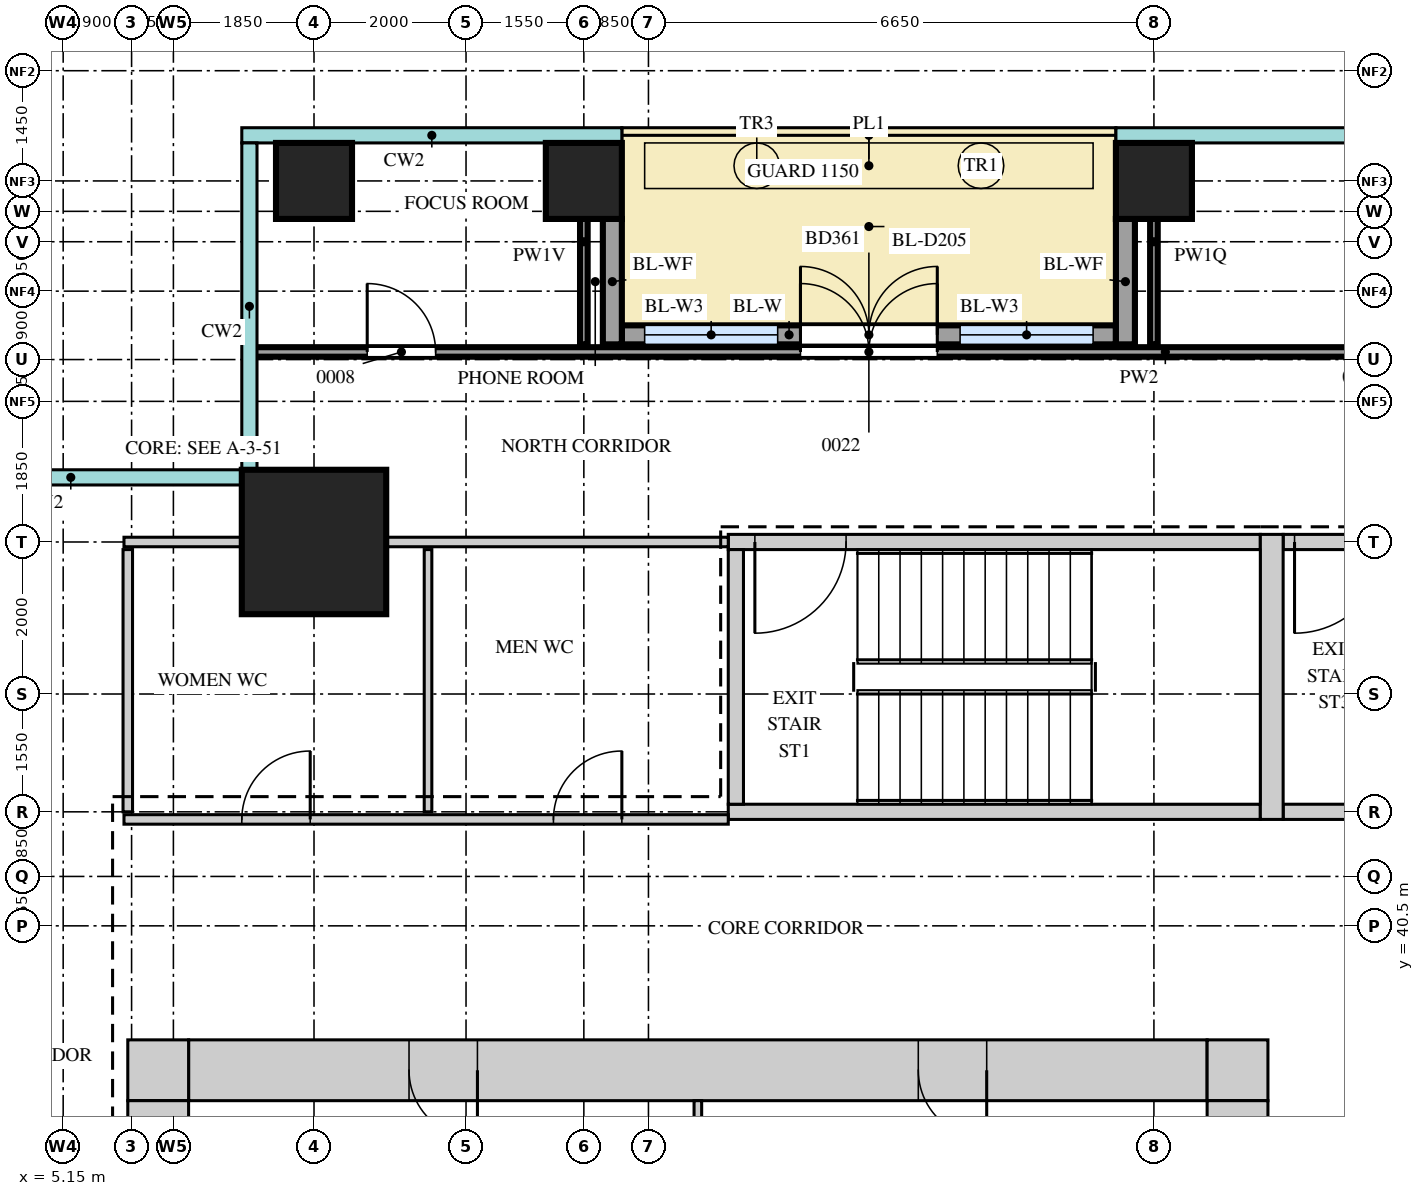
"""IFC4 building model, lengths in metres.
Left out: names, types, materials, properties, quantities, classifications, styles, units other than length and angle.
Written with IfcOpenShell. Run it as: python <this file> out.ifc"""

import sys

from ifc_helpers import new_model, si_unit, direction, frame, frame_2d, origin, origin_2d, place, context, subcontext, project, spatial, rectangle, extrude, source, transform, mapped, element, fill, save


model = new_model("IFC4")
c1 = context("Model", 3, precision=1e-05, world=origin(), true_north=direction((0.0, 1.0)))
c2 = subcontext(c1, "Body", "Model", "MODEL_VIEW")
j1 = project(units=[si_unit("LENGTHUNIT", "METRE"), si_unit("PLANEANGLEUNIT", "RADIAN")], contexts=[c1])
p1 = place(None, origin())
s1 = spatial("IfcSite", under=j1, at=p1, CompositionType="ELEMENT")
p2 = place(p1, origin())
s2 = spatial("IfcBuilding", under=s1, at=p2, CompositionType="ELEMENT")
p3 = place(p2, frame((0.0, 0.0, 168.7)))
s3 = spatial("IfcBuildingStorey", under=s2, at=p3, CompositionType="ELEMENT", Elevation=168.7)
m1 = source(origin(), c2, "Body", "SweptSolid", [
    extrude(rectangle(XDim=13.4, YDim=0.8, at=frame_2d((6.7, 0.0))), origin(), (0.0, 0.0, 1.0), 3.75),
])
p4 = place(p3, frame((6.8, 38.6, 0.0), z_axis=(0.0, 0.0, 1.0), x_axis=(1.0, 0.0, 0.0)))
e1 = element("IfcWall", 1, at=p4, inside=s3, PredefinedType="SHEAR", context=c2, shape_type="MappedRepresentation", body=[
    mapped(m1, transform((0.0, 0.0, 0.0))),
])
m2 = source(origin(), c2, "Body", "SweptSolid", [
    extrude(rectangle(XDim=0.9, YDim=2.1, at=frame_2d((0.45, 1.05))), frame((0.0, 0.41, 0.0), z_axis=(0.0, -1.0, 0.0), x_axis=(1.0, 0.0, 0.0)), (0.0, 0.0, 1.0), 0.82),
])
p5 = place(p4, frame((2.9, 0.0, 0.0)))
e2 = element("IfcOpeningElement", 2, at=p5, cuts=e1, PredefinedType="OPENING", context=c2, shape_type="MappedRepresentation", body=[
    mapped(m2, transform((0.0, 0.0, 0.0))),
])
p6 = place(p4, frame((9.6, 0.0, 0.0)))
e3 = element("IfcOpeningElement", 3, at=p6, cuts=e1, PredefinedType="OPENING", context=c2, shape_type="MappedRepresentation", body=[
    mapped(m2, transform((0.0, 0.0, 0.0))),
])
m3 = source(origin(), c2, "Body", "SweptSolid", [
    extrude(rectangle(XDim=0.8, YDim=0.8, at=frame_2d((0.4, 0.0))), origin(), (0.0, 0.0, 1.0), 3.75),
])
for number, where, z_axis, x_axis in (
    (4, (20.2, 38.6, 0.0), (0.0, 0.0, 1.0), (1.0, 0.0, 0.0)),
    (5, (6.0, 38.6, 0.0), (0.0, 0.0, 1.0), (1.0, 0.0, 0.0)),
):
    element("IfcWall", number, at=place(p3, frame(where, z_axis=z_axis, x_axis=x_axis)), inside=s3, PredefinedType="SHEAR", context=c2, shape_type="MappedRepresentation", body=[
        mapped(m3, transform((0.0, 0.0, 0.0))),
    ])
m4 = source(origin(), c2, "Body", "SweptSolid", [
    extrude(rectangle(XDim=22.4, YDim=0.8, at=frame_2d((11.2, 0.0))), origin(), (0.0, 0.0, 1.0), 3.75),
])
p7 = place(p3, frame((20.6, 15.8, 0.0), z_axis=(0.0, 0.0, 1.0), x_axis=(0.0, 1.0, 0.0)))
e6 = element("IfcWall", 6, at=p7, inside=s3, PredefinedType="SHEAR", context=c2, shape_type="MappedRepresentation", body=[
    mapped(m4, transform((0.0, 0.0, 0.0))),
])
m5 = source(origin(), c2, "Body", "SweptSolid", [
    extrude(rectangle(XDim=1.8, YDim=2.1, at=frame_2d((0.9, 1.05))), frame((0.0, 0.41, 0.0), z_axis=(0.0, -1.0, 0.0), x_axis=(1.0, 0.0, 0.0)), (0.0, 0.0, 1.0), 0.82),
])
p8 = place(p7, frame((10.7, 0.0, 0.0)))
e7 = element("IfcOpeningElement", 7, at=p8, cuts=e6, PredefinedType="OPENING", context=c2, shape_type="MappedRepresentation", body=[
    mapped(m5, transform((0.0, 0.0, 0.0))),
])
p9 = place(p7, frame((0.35, 0.0, 0.0)))
e8 = element("IfcOpeningElement", 8, at=p9, cuts=e6, PredefinedType="OPENING", context=c2, shape_type="MappedRepresentation", body=[
    mapped(m2, transform((0.0, 0.0, 0.0))),
])
p10 = place(p7, frame((2.8, 0.0, 0.0)))
e9 = element("IfcOpeningElement", 9, at=p10, cuts=e6, PredefinedType="OPENING", context=c2, shape_type="MappedRepresentation", body=[
    mapped(m2, transform((0.0, 0.0, 0.0))),
])
p11 = place(p7, frame((5.55, 0.0, 0.0)))
e10 = element("IfcOpeningElement", 10, at=p11, cuts=e6, PredefinedType="OPENING", context=c2, shape_type="MappedRepresentation", body=[
    mapped(m2, transform((0.0, 0.0, 0.0))),
])
p12 = place(p3, frame((6.4, 15.8, 0.0), z_axis=(0.0, 0.0, 1.0), x_axis=(0.0, 1.0, 0.0)))
e11 = element("IfcWall", 11, at=p12, inside=s3, PredefinedType="SHEAR", context=c2, shape_type="MappedRepresentation", body=[
    mapped(m4, transform((0.0, 0.0, 0.0))),
])
m6 = source(origin(), c2, "Body", "SweptSolid", [
    extrude(rectangle(XDim=7.0, YDim=0.2, at=frame_2d((3.5, 0.0))), origin(), (0.0, 0.0, 1.0), 3.75),
])
p13 = place(p3, frame((13.9, 45.55, 0.0), z_axis=(0.0, 0.0, 1.0), x_axis=(1.0, 0.0, 0.0)))
e12 = element("IfcWall", 12, at=p13, inside=s3, PredefinedType="SHEAR", context=c2, shape_type="MappedRepresentation", body=[
    mapped(m6, transform((0.0, 0.0, 0.0))),
])
m7 = source(origin(), c2, "Body", "SweptSolid", [
    extrude(rectangle(XDim=1.2, YDim=2.1, at=frame_2d((0.6, 1.05))), frame((0.0, 0.11, 0.0), z_axis=(0.0, -1.0, 0.0), x_axis=(1.0, 0.0, 0.0)), (0.0, 0.0, 1.0), 0.22),
])
p14 = place(p13, frame((0.35, 0.0, 0.0)))
e13 = element("IfcOpeningElement", 13, at=p14, cuts=e12, PredefinedType="OPENING", context=c2, shape_type="MappedRepresentation", body=[
    mapped(m7, transform((0.0, 0.0, 0.0))),
])
p15 = place(p3, frame((13.9, 42.0, 0.0), z_axis=(0.0, 0.0, 1.0), x_axis=(1.0, 0.0, 0.0)))
e14 = element("IfcWall", 14, at=p15, inside=s3, PredefinedType="SHEAR", context=c2, shape_type="MappedRepresentation", body=[
    mapped(m6, transform((0.0, 0.0, 0.0))),
])
m8 = source(origin(), c2, "Body", "SweptSolid", [
    extrude(rectangle(XDim=7.1, YDim=0.2, at=frame_2d((3.55, 0.0))), origin(), (0.0, 0.0, 1.0), 3.75),
])
p16 = place(p3, frame((21.2, 45.55, 0.0), z_axis=(0.0, 0.0, 1.0), x_axis=(1.0, 0.0, 0.0)))
e15 = element("IfcWall", 15, at=p16, inside=s3, PredefinedType="SHEAR", context=c2, shape_type="MappedRepresentation", body=[
    mapped(m8, transform((0.0, 0.0, 0.0))),
])
p17 = place(p16, frame((0.15, 0.0, 0.0)))
e16 = element("IfcOpeningElement", 16, at=p17, cuts=e15, PredefinedType="OPENING", context=c2, shape_type="MappedRepresentation", body=[
    mapped(m7, transform((0.0, 0.0, 0.0))),
])
p18 = place(p3, frame((21.2, 42.0, 0.0), z_axis=(0.0, 0.0, 1.0), x_axis=(1.0, 0.0, 0.0)))
e17 = element("IfcWall", 17, at=p18, inside=s3, PredefinedType="SHEAR", context=c2, shape_type="MappedRepresentation", body=[
    mapped(m8, transform((0.0, 0.0, 0.0))),
])
m9 = source(origin(), c2, "Body", "SweptSolid", [
    extrude(rectangle(XDim=3.75, YDim=0.3, at=frame_2d((1.875, 0.0))), origin(), (0.0, 0.0, 1.0), 3.75),
])
p19 = place(p3, frame((21.05, 41.9, 0.0), z_axis=(0.0, 0.0, 1.0), x_axis=(0.0, 1.0, 0.0)))
e18 = element("IfcWall", 18, at=p19, inside=s3, PredefinedType="SHEAR", context=c2, shape_type="MappedRepresentation", body=[
    mapped(m9, transform((0.0, 0.0, 0.0))),
])
m10 = source(origin(), c2, "Body", "SweptSolid", [
    extrude(rectangle(XDim=3.35, YDim=0.2, at=frame_2d((1.675, 0.0))), origin(), (0.0, 0.0, 1.0), 3.75),
])
p20 = place(p3, frame((14.0, 42.1, 0.0), z_axis=(0.0, 0.0, 1.0), x_axis=(0.0, 1.0, 0.0)))
e19 = element("IfcWall", 19, at=p20, inside=s3, PredefinedType="SHEAR", context=c2, shape_type="MappedRepresentation", body=[
    mapped(m10, transform((0.0, 0.0, 0.0))),
])
m11 = source(origin(), c2, "Body", "SweptSolid", [
    extrude(rectangle(XDim=1.9, YDim=1.9, at=origin_2d()), origin(), (0.0, 0.0, 1.0), 4.0),
])
p21 = place(p3, frame((8.45, 45.55, 0.0), z_axis=(0.0, 0.0, 1.0), x_axis=(1.0, 0.0, 0.0)))
e20 = element("IfcColumn", 20, at=p21, inside=s3, PredefinedType="COLUMN", context=c2, shape_type="MappedRepresentation", body=[
    mapped(m11, transform((0.0, 0.0, 0.0))),
])
m12 = source(origin(), c2, "Body", "SweptSolid", [
    extrude(rectangle(XDim=1.0, YDim=1.0, at=origin_2d()), origin(), (0.0, 0.0, 1.0), 3.75),
])
for number, where, z_axis, x_axis in (
    (21, (8.45, 50.3, 0.0), (0.0, 0.0, 1.0), (1.0, 0.0, 0.0)),
    (22, (12.0, 50.3, 0.0), (0.0, 0.0, 1.0), (1.0, 0.0, 0.0)),
    (23, (19.5, 50.3, 0.0), (0.0, 0.0, 1.0), (1.0, 0.0, 0.0)),
):
    element("IfcColumn", number, at=place(p3, frame(where, z_axis=z_axis, x_axis=x_axis)), inside=s3, PredefinedType="COLUMN", context=c2, shape_type="MappedRepresentation", body=[
        mapped(m12, transform((0.0, 0.0, 0.0))),
    ])
m13 = source(origin(), c2, "Body", "SweptSolid", [
    extrude(rectangle(XDim=6.5, YDim=0.25, at=frame_2d((3.25, 0.0))), origin(), (0.0, 0.0, 1.0), 3.75),
])
p22 = place(p3, frame((12.5, 48.275, 0.0), z_axis=(0.0, 0.0, 1.0), x_axis=(1.0, 0.0, 0.0)))
e24 = element("IfcWall", 24, at=p22, inside=s3, PredefinedType="SOLIDWALL", context=c2, shape_type="MappedRepresentation", body=[
    mapped(m13, transform((0.0, 0.0, 0.0))),
])
m14 = source(origin(), c2, "Body", "SweptSolid", [
    extrude(rectangle(XDim=1.75, YDim=2.4, at=frame_2d((0.875, 1.2))), frame((0.0, 0.135, 0.0), z_axis=(0.0, -1.0, 0.0), x_axis=(1.0, 0.0, 0.0)), (0.0, 0.0, 1.0), 0.27),
])
p23 = place(p22, frame((0.3, 0.0, 0.0)))
e25 = element("IfcOpeningElement", 25, at=p23, cuts=e24, PredefinedType="OPENING", context=c2, shape_type="MappedRepresentation", body=[
    mapped(m14, transform((0.0, 0.0, 0.0))),
])
p24 = place(p22, frame((4.45, 0.0, 0.0)))
e26 = element("IfcOpeningElement", 26, at=p24, cuts=e24, PredefinedType="OPENING", context=c2, shape_type="MappedRepresentation", body=[
    mapped(m14, transform((0.0, 0.0, 0.0))),
])
m15 = source(origin(), c2, "Body", "SweptSolid", [
    extrude(rectangle(XDim=1.8, YDim=2.4, at=frame_2d((0.9, 1.2))), frame((0.0, 0.135, 0.0), z_axis=(0.0, -1.0, 0.0), x_axis=(1.0, 0.0, 0.0)), (0.0, 0.0, 1.0), 0.27),
])
p25 = place(p22, frame((2.35, 0.0, 0.0)))
e27 = element("IfcOpeningElement", 27, at=p25, cuts=e24, PredefinedType="OPENING", context=c2, shape_type="MappedRepresentation", body=[
    mapped(m15, transform((0.0, 0.0, 0.0))),
])
m16 = source(origin(), c2, "Body", "SweptSolid", [
    extrude(rectangle(XDim=1.65, YDim=0.25, at=frame_2d((0.825, 0.0))), origin(), (0.0, 0.0, 1.0), 3.45),
])
for number, where, z_axis, x_axis in (
    (28, (12.375, 49.8, 0.0), (0.0, 0.0, 1.0), (0.0, -1.0, 0.0)),
    (29, (19.125, 49.8, 0.0), (0.0, 0.0, 1.0), (0.0, -1.0, 0.0)),
):
    element("IfcWall", number, at=place(p3, frame(where, z_axis=z_axis, x_axis=x_axis)), inside=s3, PredefinedType="SOLIDWALL", context=c2, shape_type="MappedRepresentation", body=[
        mapped(m16, transform((0.0, 0.0, 0.0))),
    ])
m17 = source(origin(), c2, "Body", "SweptSolid", [
    extrude(rectangle(XDim=6.0, YDim=0.1, at=frame_2d((3.0, 0.0))), origin(), (0.0, 0.0, 1.0), 3.8),
])
p26 = place(p3, frame((13.5, 32.2, 0.0), z_axis=(0.0, 0.0, 1.0), x_axis=(0.0, 1.0, 0.0)))
e30 = element("IfcWall", 30, at=p26, inside=s3, PredefinedType="PARTITIONING", context=c2, shape_type="MappedRepresentation", body=[
    mapped(m17, transform((0.0, 0.0, 0.0))),
])
m18 = source(origin(), c2, "Body", "SweptSolid", [
    extrude(rectangle(XDim=7.95, YDim=0.125, at=frame_2d((3.975, 0.0))), origin(), (0.0, 0.0, 1.0), 3.8),
])
p27 = place(p3, frame((5.95, 41.9, 0.0), z_axis=(0.0, 0.0, 1.0), x_axis=(1.0, 0.0, 0.0)))
e31 = element("IfcWall", 31, at=p27, inside=s3, PredefinedType="PARTITIONING", context=c2, shape_type="MappedRepresentation", body=[
    mapped(m18, transform((0.0, 0.0, 0.0))),
])
m19 = source(origin(), c2, "Body", "SweptSolid", [
    extrude(rectangle(XDim=0.9, YDim=2.1, at=frame_2d((0.45, 1.05))), frame((0.0, 0.073, 0.0), z_axis=(0.0, -1.0, 0.0), x_axis=(1.0, 0.0, 0.0)), (0.0, 0.0, 1.0), 0.145),
])
p28 = place(p27, frame((1.55, 0.0, 0.0)))
e32 = element("IfcOpeningElement", 32, at=p28, cuts=e31, PredefinedType="OPENING", context=c2, shape_type="MappedRepresentation", body=[
    mapped(m19, transform((0.0, 0.0, 0.0))),
])
p29 = place(p27, frame((5.65, 0.0, 0.0)))
e33 = element("IfcOpeningElement", 33, at=p29, cuts=e31, PredefinedType="OPENING", context=c2, shape_type="MappedRepresentation", body=[
    mapped(m19, transform((0.0, 0.0, 0.0))),
])
m20 = source(origin(), c2, "Body", "SweptSolid", [
    extrude(rectangle(XDim=3.45, YDim=0.125, at=frame_2d((1.725, 0.0))), origin(), (0.0, 0.0, 1.0), 3.8),
])
p30 = place(p3, frame((6.0, 42.0, 0.0), z_axis=(0.0, 0.0, 1.0), x_axis=(0.0, 1.0, 0.0)))
e34 = element("IfcWall", 34, at=p30, inside=s3, PredefinedType="PARTITIONING", context=c2, shape_type="MappedRepresentation", body=[
    mapped(m20, transform((0.0, 0.0, 0.0))),
])
m21 = source(origin(), c2, "Body", "SweptSolid", [
    extrude(rectangle(XDim=3.45, YDim=0.1, at=frame_2d((1.725, 0.0))), origin(), (0.0, 0.0, 1.0), 3.8),
])
p31 = place(p3, frame((9.95, 42.0, 0.0), z_axis=(0.0, 0.0, 1.0), x_axis=(0.0, 1.0, 0.0)))
e35 = element("IfcWall", 35, at=p31, inside=s3, PredefinedType="PARTITIONING", context=c2, shape_type="MappedRepresentation", body=[
    mapped(m21, transform((0.0, 0.0, 0.0))),
])
m22 = source(origin(), c2, "Body", "SweptSolid", [
    extrude(rectangle(XDim=7.95, YDim=0.125, at=frame_2d((3.975, 0.0))), origin(), (0.0, 0.0, 1.0), 3.25),
])
p32 = place(p3, frame((5.95, 45.55, 0.0), z_axis=(0.0, 0.0, 1.0), x_axis=(1.0, 0.0, 0.0)))
e36 = element("IfcWall", 36, at=p32, inside=s3, PredefinedType="PARTITIONING", context=c2, shape_type="MappedRepresentation", body=[
    mapped(m22, transform((0.0, 0.0, 0.0))),
])
m23 = source(origin(), c2, "Body", "SweptSolid", [
    extrude(rectangle(XDim=23.75, YDim=0.125, at=frame_2d((11.875, 0.0))), origin(), (0.0, 0.0, 1.0), 3.8),
])
p33 = place(p3, frame((7.65, 48.05, 0.0), z_axis=(0.0, 0.0, 1.0), x_axis=(1.0, 0.0, 0.0)))
e37 = element("IfcWall", 37, at=p33, inside=s3, PredefinedType="PARTITIONING", context=c2, shape_type="MappedRepresentation", body=[
    mapped(m23, transform((0.0, 0.0, 0.0))),
])
p34 = place(p33, frame((1.5, 0.0, 0.0)))
e38 = element("IfcOpeningElement", 38, at=p34, cuts=e37, PredefinedType="OPENING", context=c2, shape_type="MappedRepresentation", body=[
    mapped(m19, transform((0.0, 0.0, 0.0))),
])
m24 = source(origin(), c2, "Body", "SweptSolid", [
    extrude(rectangle(XDim=1.8, YDim=2.1, at=frame_2d((0.9, 1.05))), frame((0.0, 0.073, 0.0), z_axis=(0.0, -1.0, 0.0), x_axis=(1.0, 0.0, 0.0)), (0.0, 0.0, 1.0), 0.145),
])
p35 = place(p33, frame((7.2, 0.0, 0.0)))
e39 = element("IfcOpeningElement", 39, at=p35, cuts=e37, PredefinedType="OPENING", context=c2, shape_type="MappedRepresentation", body=[
    mapped(m24, transform((0.0, 0.0, 0.0))),
])
p36 = place(p33, frame((15.0, 0.0, 0.0)))
e40 = element("IfcOpeningElement", 40, at=p36, cuts=e37, PredefinedType="OPENING", context=c2, shape_type="MappedRepresentation", body=[
    mapped(m19, transform((0.0, 0.0, 0.0))),
])
p37 = place(p33, frame((21.05, 0.0, 0.0)))
e41 = element("IfcOpeningElement", 41, at=p37, cuts=e37, PredefinedType="OPENING", context=c2, shape_type="MappedRepresentation", body=[
    mapped(m19, transform((0.0, 0.0, 0.0))),
])
m25 = source(origin(), c2, "Body", "SweptSolid", [
    extrude(rectangle(XDim=2.7, YDim=0.1, at=frame_2d((1.35, 0.0))), origin(), (0.0, 0.0, 1.0), 3.25),
])
p38 = place(p3, frame((12.0, 48.15, 0.0), z_axis=(0.0, 0.0, 1.0), x_axis=(0.0, 1.0, 0.0)))
e42 = element("IfcWall", 42, at=p38, inside=s3, PredefinedType="PARTITIONING", context=c2, shape_type="MappedRepresentation", body=[
    mapped(m25, transform((0.0, 0.0, 0.0))),
])
m26 = source(origin(), c2, "Body", "SweptSolid", [
    extrude(rectangle(XDim=2.7, YDim=0.1, at=frame_2d((1.35, 0.0))), origin(), (0.0, 0.0, 1.0), 3.42),
])
p39 = place(p3, frame((19.5, 48.15, 0.0), z_axis=(0.0, 0.0, 1.0), x_axis=(0.0, 1.0, 0.0)))
e43 = element("IfcWall", 43, at=p39, inside=s3, PredefinedType="PARTITIONING", context=c2, shape_type="MappedRepresentation", body=[
    mapped(m26, transform((0.0, 0.0, 0.0))),
])
m27 = source(origin(), c2, "Body", "SweptSolid", [
    extrude(rectangle(XDim=1.75, YDim=2.4, at=frame_2d((0.875, 1.2))), frame((0.0, 0.03, 0.0), z_axis=(0.0, -1.0, 0.0), x_axis=(1.0, 0.0, 0.0)), (0.0, 0.0, 1.0), 0.06),
])
p40 = place(p23, origin())
e44 = element("IfcWindow", 44, at=p40, inside=s3, PartitioningType="SINGLE_PANEL", PredefinedType="WINDOW", context=c2, shape_type="MappedRepresentation", body=[
    mapped(m27, transform((0.0, 0.0, 0.0))),
])
fill(e25, e44)
p41 = place(p24, origin())
e45 = element("IfcWindow", 45, at=p41, inside=s3, PartitioningType="SINGLE_PANEL", PredefinedType="WINDOW", context=c2, shape_type="MappedRepresentation", body=[
    mapped(m27, transform((0.0, 0.0, 0.0))),
])
fill(e26, e45)
m28 = source(origin(), c2, "Body", "SweptSolid", [
    extrude(rectangle(XDim=1.8, YDim=2.4, at=frame_2d((0.9, 1.2))), frame((0.0, 0.025, 0.0), z_axis=(0.0, -1.0, 0.0), x_axis=(1.0, 0.0, 0.0)), (0.0, 0.0, 1.0), 0.05),
])
p42 = place(p25, origin())
e46 = element("IfcDoor", 46, at=p42, inside=s3, OperationType="DOUBLE_DOOR_DOUBLE_SWING", PredefinedType="DOOR", context=c2, shape_type="MappedRepresentation", body=[
    mapped(m28, transform((0.0, 0.0, 0.0))),
])
fill(e27, e46)
m29 = source(origin(), c2, "Body", "SweptSolid", [
    extrude(rectangle(XDim=0.9, YDim=2.1, at=frame_2d((0.45, 1.05))), frame((0.0, 0.35, 0.0), z_axis=(0.0, -1.0, 0.0), x_axis=(1.0, 0.0, 0.0)), (0.0, 0.0, 1.0), 0.7),
])
p43 = place(p5, origin())
e47 = element("IfcDoor", 47, at=p43, inside=s3, OperationType="SINGLE_SWING_RIGHT", PredefinedType="DOOR", context=c2, shape_type="MappedRepresentation", body=[
    mapped(m29, transform((0.0, 0.0, 0.0))),
])
fill(e2, e47)
p44 = place(p6, origin())
e48 = element("IfcDoor", 48, at=p44, inside=s3, OperationType="SINGLE_SWING_RIGHT", PredefinedType="DOOR", context=c2, shape_type="MappedRepresentation", body=[
    mapped(m29, transform((0.0, 0.0, 0.0))),
])
fill(e3, e48)
m30 = source(origin(), c2, "Body", "SweptSolid", [
    extrude(rectangle(XDim=0.9, YDim=2.1, at=frame_2d((0.45, 1.05))), frame((0.0, 0.025, 0.0), z_axis=(0.0, -1.0, 0.0), x_axis=(1.0, 0.0, 0.0)), (0.0, 0.0, 1.0), 0.05),
])
p45 = place(p28, origin())
e49 = element("IfcDoor", 49, at=p45, inside=s3, OperationType="SINGLE_SWING_LEFT", PredefinedType="DOOR", context=c2, shape_type="MappedRepresentation", body=[
    mapped(m30, transform((0.0, 0.0, 0.0))),
])
fill(e32, e49)
p46 = place(p29, origin())
e50 = element("IfcDoor", 50, at=p46, inside=s3, OperationType="SINGLE_SWING_LEFT", PredefinedType="DOOR", context=c2, shape_type="MappedRepresentation", body=[
    mapped(m30, transform((0.0, 0.0, 0.0))),
])
fill(e33, e50)
p47 = place(p34, origin())
e51 = element("IfcDoor", 51, at=p47, inside=s3, OperationType="SINGLE_SWING_RIGHT", PredefinedType="DOOR", context=c2, shape_type="MappedRepresentation", body=[
    mapped(m30, transform((0.0, 0.0, 0.0))),
])
fill(e38, e51)
m31 = source(origin(), c2, "Body", "SweptSolid", [
    extrude(rectangle(XDim=1.8, YDim=2.1, at=frame_2d((0.9, 1.05))), frame((0.0, 0.025, 0.0), z_axis=(0.0, -1.0, 0.0), x_axis=(1.0, 0.0, 0.0)), (0.0, 0.0, 1.0), 0.05),
])
p48 = place(p35, origin())
e52 = element("IfcDoor", 52, at=p48, inside=s3, OperationType="DOUBLE_DOOR_SINGLE_SWING", PredefinedType="DOOR", context=c2, shape_type="MappedRepresentation", body=[
    mapped(m31, transform((0.0, 0.0, 0.0))),
])
fill(e39, e52)
m32 = source(origin(), c2, "Body", "SweptSolid", [
    extrude(rectangle(XDim=1.2, YDim=2.1, at=frame_2d((0.6, 1.05))), frame((0.0, 0.025, 0.0), z_axis=(0.0, -1.0, 0.0), x_axis=(1.0, 0.0, 0.0)), (0.0, 0.0, 1.0), 0.05),
])
p49 = place(p14, origin())
e53 = element("IfcDoor", 53, at=p49, inside=s3, OperationType="SINGLE_SWING_LEFT", PredefinedType="DOOR", context=c2, shape_type="MappedRepresentation", body=[
    mapped(m32, transform((0.0, 0.0, 0.0))),
])
fill(e13, e53)
p50 = place(p17, origin())
e54 = element("IfcDoor", 54, at=p50, inside=s3, OperationType="SINGLE_SWING_LEFT", PredefinedType="DOOR", context=c2, shape_type="MappedRepresentation", body=[
    mapped(m32, transform((0.0, 0.0, 0.0))),
])
fill(e16, e54)
save(model, sys.argv[1])
